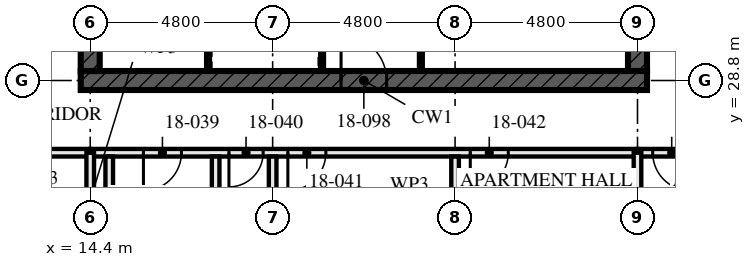
"""IFC4 building model, lengths in metres.
Left out: names, types, materials, properties, quantities, classifications, styles, units other than length and angle.
Written with IfcOpenShell. Run it as: python <this file> out.ifc"""

import sys

from ifc_helpers import new_model, si_unit, direction, frame, frame_2d, origin, place, context, subcontext, project, spatial, rectangle, extrude, element, fill, save


model = new_model("IFC4")
c1 = context("Model", 3, precision=1e-05, world=origin(), true_north=direction((0.0, 1.0)))
c2 = subcontext(c1, "Body", "Model", "MODEL_VIEW")
j1 = project(units=[si_unit("LENGTHUNIT", "METRE"), si_unit("PLANEANGLEUNIT", "RADIAN")], contexts=[c1])
p1 = place(None, origin())
s1 = spatial("IfcSite", under=j1, at=p1, CompositionType="ELEMENT")
p2 = place(p1, origin())
s2 = spatial("IfcBuilding", under=s1, at=p2, CompositionType="ELEMENT")
p3 = place(p2, frame((0.0, 0.0, 69.0)))
s3 = spatial("IfcBuildingStorey", under=s2, at=p3, CompositionType="ELEMENT", Elevation=69.0)
p4 = place(p3, frame((14.15, 28.8, -0.17), z_axis=(0.0, 0.0, 1.0), x_axis=(1.0, 0.0, 0.0)))
e1 = element("IfcWall", 1, at=p4, inside=s3, PredefinedType="SHEAR", context=c2, shape_type="SweptSolid", body=[
    extrude(rectangle(XDim=14.9, YDim=0.5, at=frame_2d((7.45, 0.0))), origin(), (0.0, 0.0, 1.0), 3.5),
])
p5 = place(p4, frame((6.85, 0.0, 0.17)))
e2 = element("IfcOpeningElement", 2, at=p5, cuts=e1, PredefinedType="OPENING", context=c2, shape_type="SweptSolid", body=[
    extrude(rectangle(XDim=1.2, YDim=2.1, at=frame_2d((0.6, 1.05))), frame((0.0, 0.26, 0.0), z_axis=(0.0, -1.0, 0.0), x_axis=(1.0, 0.0, 0.0)), (0.0, 0.0, 1.0), 0.521),
])
p6 = place(p3, frame((14.4, 42.95, -0.17), z_axis=(0.0, 0.0, 1.0), x_axis=(0.0, -1.0, 0.0)))
e3 = element("IfcWall", 3, at=p6, inside=s3, PredefinedType="SHEAR", context=c2, shape_type="SweptSolid", body=[
    extrude(rectangle(XDim=13.9, YDim=0.5, at=frame_2d((6.95, 0.0))), origin(), (0.0, 0.0, 1.0), 3.5),
])
p7 = place(p6, frame((6.35, 0.0, 0.17)))
e4 = element("IfcOpeningElement", 4, at=p7, cuts=e3, PredefinedType="OPENING", context=c2, shape_type="SweptSolid", body=[
    extrude(rectangle(XDim=1.2, YDim=2.1, at=frame_2d((0.6, 1.05))), frame((0.0, 0.26, 0.0), z_axis=(0.0, -1.0, 0.0), x_axis=(1.0, 0.0, 0.0)), (0.0, 0.0, 1.0), 0.521),
])
p8 = place(p3, frame((28.8, 29.05, -0.17), z_axis=(0.0, 0.0, 1.0), x_axis=(0.0, 1.0, 0.0)))
e5 = element("IfcWall", 5, at=p8, inside=s3, PredefinedType="SHEAR", context=c2, shape_type="SweptSolid", body=[
    extrude(rectangle(XDim=13.9, YDim=0.5, at=frame_2d((6.95, 0.0))), origin(), (0.0, 0.0, 1.0), 3.5),
])
p9 = place(p8, frame((6.35, 0.0, 0.17)))
e6 = element("IfcOpeningElement", 6, at=p9, cuts=e5, PredefinedType="OPENING", context=c2, shape_type="SweptSolid", body=[
    extrude(rectangle(XDim=1.2, YDim=2.1, at=frame_2d((0.6, 1.05))), frame((0.0, 0.26, 0.0), z_axis=(0.0, -1.0, 0.0), x_axis=(1.0, 0.0, 0.0)), (0.0, 0.0, 1.0), 0.521),
])
p10 = place(p3, frame((4.8, 26.9, 0.0), z_axis=(0.0, 0.0, 1.0), x_axis=(1.0, 0.0, 0.0)))
e7 = element("IfcWall", 7, at=p10, inside=s3, PredefinedType="PARTITIONING", context=c2, shape_type="SweptSolid", body=[
    extrude(rectangle(XDim=9.6, YDim=0.2, at=frame_2d((4.8, 0.0))), origin(), (0.0, 0.0, 1.0), 3.33),
])
p11 = place(p10, frame((0.4, 0.0, 0.0)))
e8 = element("IfcOpeningElement", 8, at=p11, cuts=e7, PredefinedType="OPENING", context=c2, shape_type="SweptSolid", body=[
    extrude(rectangle(XDim=1.0, YDim=2.1, at=frame_2d((0.5, 1.05))), frame((0.0, 0.111, 0.0), z_axis=(0.0, -1.0, 0.0), x_axis=(1.0, 0.0, 0.0)), (0.0, 0.0, 1.0), 0.221),
])
p12 = place(p10, frame((5.2, 0.0, 0.0)))
e9 = element("IfcOpeningElement", 9, at=p12, cuts=e7, PredefinedType="OPENING", context=c2, shape_type="SweptSolid", body=[
    extrude(rectangle(XDim=1.0, YDim=2.1, at=frame_2d((0.5, 1.05))), frame((0.0, 0.111, 0.0), z_axis=(0.0, -1.0, 0.0), x_axis=(1.0, 0.0, 0.0)), (0.0, 0.0, 1.0), 0.221),
])
for number, where, z_axis, x_axis in (
    (10, (14.9, 22.1, 0.0), (0.0, 0.0, 1.0), (0.0, 1.0, 0.0)),
    (11, (17.7, 22.1, 0.0), (0.0, 0.0, 1.0), (0.0, 1.0, 0.0)),
):
    element("IfcWall", number, at=place(p3, frame(where, z_axis=z_axis, x_axis=x_axis)), inside=s3, PredefinedType="SOLIDWALL", context=c2, shape_type="SweptSolid", body=[
        extrude(rectangle(XDim=4.7, YDim=0.2, at=frame_2d((2.35, 0.0))), origin(), (0.0, 0.0, 1.0), 2.99),
    ])
for number, where, z_axis, x_axis in (
    (12, (19.2, 14.72, 0.0), (0.0, 0.0, 1.0), (0.0, 1.0, 0.0)),
    (13, (24.0, 14.72, 0.0), (0.0, 0.0, 1.0), (0.0, 1.0, 0.0)),
):
    element("IfcWall", number, at=place(p3, frame(where, z_axis=z_axis, x_axis=x_axis)), inside=s3, PredefinedType="PARTITIONING", context=c2, shape_type="SweptSolid", body=[
        extrude(rectangle(XDim=12.08, YDim=0.2, at=frame_2d((6.04, 0.0))), origin(), (0.0, 0.0, 1.0), 2.55),
    ])
p13 = place(p3, frame((14.4, 26.9, 0.0), z_axis=(0.0, 0.0, 1.0), x_axis=(1.0, 0.0, 0.0)))
e14 = element("IfcWall", 14, at=p13, inside=s3, PredefinedType="PARTITIONING", context=c2, shape_type="SweptSolid", body=[
    extrude(rectangle(XDim=14.4, YDim=0.2, at=frame_2d((7.2, 0.0))), origin(), (0.0, 0.0, 1.0), 2.55),
])
p14 = place(p13, frame((1.4, 0.0, 0.0)))
e15 = element("IfcOpeningElement", 15, at=p14, cuts=e14, PredefinedType="OPENING", context=c2, shape_type="SweptSolid", body=[
    extrude(rectangle(XDim=1.0, YDim=2.1, at=frame_2d((0.5, 1.05))), frame((0.0, 0.111, 0.0), z_axis=(0.0, -1.0, 0.0), x_axis=(1.0, 0.0, 0.0)), (0.0, 0.0, 1.0), 0.221),
])
p15 = place(p13, frame((3.65, 0.0, 0.0)))
e16 = element("IfcOpeningElement", 16, at=p15, cuts=e14, PredefinedType="OPENING", context=c2, shape_type="SweptSolid", body=[
    extrude(rectangle(XDim=0.9, YDim=2.1, at=frame_2d((0.45, 1.05))), frame((0.0, 0.111, 0.0), z_axis=(0.0, -1.0, 0.0), x_axis=(1.0, 0.0, 0.0)), (0.0, 0.0, 1.0), 0.221),
])
p16 = place(p13, frame((5.2, 0.0, 0.0)))
e17 = element("IfcOpeningElement", 17, at=p16, cuts=e14, PredefinedType="OPENING", context=c2, shape_type="SweptSolid", body=[
    extrude(rectangle(XDim=1.0, YDim=2.1, at=frame_2d((0.5, 1.05))), frame((0.0, 0.111, 0.0), z_axis=(0.0, -1.0, 0.0), x_axis=(1.0, 0.0, 0.0)), (0.0, 0.0, 1.0), 0.221),
])
p17 = place(p13, frame((10.0, 0.0, 0.0)))
e18 = element("IfcOpeningElement", 18, at=p17, cuts=e14, PredefinedType="OPENING", context=c2, shape_type="SweptSolid", body=[
    extrude(rectangle(XDim=1.0, YDim=2.1, at=frame_2d((0.5, 1.05))), frame((0.0, 0.111, 0.0), z_axis=(0.0, -1.0, 0.0), x_axis=(1.0, 0.0, 0.0)), (0.0, 0.0, 1.0), 0.221),
])
p18 = place(p3, frame((28.8, 26.9, 0.0), z_axis=(0.0, 0.0, 1.0), x_axis=(1.0, 0.0, 0.0)))
e19 = element("IfcWall", 19, at=p18, inside=s3, PredefinedType="PARTITIONING", context=c2, shape_type="SweptSolid", body=[
    extrude(rectangle(XDim=9.6, YDim=0.2, at=frame_2d((4.8, 0.0))), origin(), (0.0, 0.0, 1.0), 3.33),
])
p19 = place(p18, frame((0.4, 0.0, 0.0)))
e20 = element("IfcOpeningElement", 20, at=p19, cuts=e19, PredefinedType="OPENING", context=c2, shape_type="SweptSolid", body=[
    extrude(rectangle(XDim=1.0, YDim=2.1, at=frame_2d((0.5, 1.05))), frame((0.0, 0.111, 0.0), z_axis=(0.0, -1.0, 0.0), x_axis=(1.0, 0.0, 0.0)), (0.0, 0.0, 1.0), 0.221),
])
p20 = place(p18, frame((5.2, 0.0, 0.0)))
e21 = element("IfcOpeningElement", 21, at=p20, cuts=e19, PredefinedType="OPENING", context=c2, shape_type="SweptSolid", body=[
    extrude(rectangle(XDim=1.0, YDim=2.1, at=frame_2d((0.5, 1.05))), frame((0.0, 0.111, 0.0), z_axis=(0.0, -1.0, 0.0), x_axis=(1.0, 0.0, 0.0)), (0.0, 0.0, 1.0), 0.221),
])
p21 = place(p3, frame((20.5, 29.05, 0.0), z_axis=(0.0, 0.0, 1.0), x_axis=(0.0, 1.0, 0.0)))
e22 = element("IfcWall", 22, at=p21, inside=s3, PredefinedType="SOLIDWALL", context=c2, shape_type="SweptSolid", body=[
    extrude(rectangle(XDim=5.8, YDim=0.1, at=frame_2d((2.9, 0.0))), origin(), (0.0, 0.0, 1.0), 3.33),
])
p22 = place(p21, frame((0.8, 0.0, 0.0)))
e23 = element("IfcOpeningElement", 23, at=p22, cuts=e22, PredefinedType="OPENING", context=c2, shape_type="SweptSolid", body=[
    extrude(rectangle(XDim=1.1, YDim=2.3, at=frame_2d((0.55, 1.15))), frame((0.0, 0.061, 0.0), z_axis=(0.0, -1.0, 0.0), x_axis=(1.0, 0.0, 0.0)), (0.0, 0.0, 1.0), 0.121),
])
p23 = place(p21, frame((3.775, 0.0, 0.0)))
e24 = element("IfcOpeningElement", 24, at=p23, cuts=e22, PredefinedType="OPENING", context=c2, shape_type="SweptSolid", body=[
    extrude(rectangle(XDim=1.1, YDim=2.3, at=frame_2d((0.55, 1.15))), frame((0.0, 0.061, 0.0), z_axis=(0.0, -1.0, 0.0), x_axis=(1.0, 0.0, 0.0)), (0.0, 0.0, 1.0), 0.121),
])
p24 = place(p3, frame((23.1, 29.05, 0.0), z_axis=(0.0, 0.0, 1.0), x_axis=(0.0, 1.0, 0.0)))
e25 = element("IfcWall", 25, at=p24, inside=s3, PredefinedType="SOLIDWALL", context=c2, shape_type="SweptSolid", body=[
    extrude(rectangle(XDim=5.8, YDim=0.1, at=frame_2d((2.9, 0.0))), origin(), (0.0, 0.0, 1.0), 3.33),
])
p25 = place(p24, frame((1.0, 0.0, 0.0)))
e26 = element("IfcOpeningElement", 26, at=p25, cuts=e25, PredefinedType="OPENING", context=c2, shape_type="SweptSolid", body=[
    extrude(rectangle(XDim=0.7, YDim=2.1, at=frame_2d((0.35, 1.05))), frame((0.0, 0.061, 0.0), z_axis=(0.0, -1.0, 0.0), x_axis=(1.0, 0.0, 0.0)), (0.0, 0.0, 1.0), 0.121),
])
p26 = place(p3, frame((17.5, 29.05, 0.0), z_axis=(0.0, 0.0, 1.0), x_axis=(0.0, 1.0, 0.0)))
e27 = element("IfcWall", 27, at=p26, inside=s3, PredefinedType="SOLIDWALL", context=c2, shape_type="SweptSolid", body=[
    extrude(rectangle(XDim=5.8, YDim=0.1, at=frame_2d((2.9, 0.0))), origin(), (0.0, 0.0, 1.0), 3.33),
])
for number, where, z_axis, x_axis in (
    (28, (14.4, 24.395, 0.0), (0.0, 0.0, 1.0), (0.0, 1.0, 0.0)),
    (29, (28.8, 24.395, 0.0), (0.0, 0.0, 1.0), (0.0, 1.0, 0.0)),
):
    element("IfcWall", number, at=place(p3, frame(where, z_axis=z_axis, x_axis=x_axis)), inside=s3, PredefinedType="PARTITIONING", context=c2, shape_type="SweptSolid", body=[
        extrude(rectangle(XDim=2.505, YDim=0.2, at=frame_2d((1.252, 0.0))), origin(), (0.0, 0.0, 1.0), 2.32),
    ])
p27 = place(p14, frame((1.0, 0.0, 0.0), z_axis=(0.0, 0.0, 1.0), x_axis=(-1.0, 0.0, 0.0)))
e30 = element("IfcDoor", 30, at=p27, inside=s3, OperationType="SINGLE_SWING_LEFT", PredefinedType="DOOR", context=c2, shape_type="SweptSolid", body=[
    extrude(rectangle(XDim=1.0, YDim=2.1, at=frame_2d((0.5, 1.05))), frame((0.0, 0.032, 0.0), z_axis=(0.0, -1.0, 0.0), x_axis=(1.0, 0.0, 0.0)), (0.0, 0.0, 1.0), 0.064),
])
fill(e15, e30)
p28 = place(p15, frame((0.9, 0.0, 0.0), z_axis=(0.0, 0.0, 1.0), x_axis=(-1.0, 0.0, 0.0)))
e31 = element("IfcDoor", 31, at=p28, inside=s3, OperationType="SINGLE_SWING_LEFT", PredefinedType="DOOR", context=c2, shape_type="SweptSolid", body=[
    extrude(rectangle(XDim=0.9, YDim=2.1, at=frame_2d((0.45, 1.05))), frame((0.0, 0.027, 0.0), z_axis=(0.0, -1.0, 0.0), x_axis=(1.0, 0.0, 0.0)), (0.0, 0.0, 1.0), 0.054),
])
fill(e16, e31)
p29 = place(p16, frame((1.0, 0.0, 0.0), z_axis=(0.0, 0.0, 1.0), x_axis=(-1.0, 0.0, 0.0)))
e32 = element("IfcDoor", 32, at=p29, inside=s3, OperationType="SINGLE_SWING_LEFT", PredefinedType="DOOR", context=c2, shape_type="SweptSolid", body=[
    extrude(rectangle(XDim=1.0, YDim=2.1, at=frame_2d((0.5, 1.05))), frame((0.0, 0.027, 0.0), z_axis=(0.0, -1.0, 0.0), x_axis=(1.0, 0.0, 0.0)), (0.0, 0.0, 1.0), 0.054),
])
fill(e17, e32)
p30 = place(p17, frame((1.0, 0.0, 0.0), z_axis=(0.0, 0.0, 1.0), x_axis=(-1.0, 0.0, 0.0)))
e33 = element("IfcDoor", 33, at=p30, inside=s3, OperationType="SINGLE_SWING_LEFT", PredefinedType="DOOR", context=c2, shape_type="SweptSolid", body=[
    extrude(rectangle(XDim=1.0, YDim=2.1, at=frame_2d((0.5, 1.05))), frame((0.0, 0.027, 0.0), z_axis=(0.0, -1.0, 0.0), x_axis=(1.0, 0.0, 0.0)), (0.0, 0.0, 1.0), 0.054),
])
fill(e18, e33)
p31 = place(p19, frame((1.0, 0.0, 0.0), z_axis=(0.0, 0.0, 1.0), x_axis=(-1.0, 0.0, 0.0)))
e34 = element("IfcDoor", 34, at=p31, inside=s3, OperationType="SINGLE_SWING_RIGHT", PredefinedType="DOOR", context=c2, shape_type="SweptSolid", body=[
    extrude(rectangle(XDim=1.0, YDim=2.1, at=frame_2d((0.5, 1.05))), frame((0.0, 0.027, 0.0), z_axis=(0.0, -1.0, 0.0), x_axis=(1.0, 0.0, 0.0)), (0.0, 0.0, 1.0), 0.054),
])
fill(e20, e34)
p32 = place(p5, origin())
e35 = element("IfcDoor", 35, at=p32, inside=s3, OperationType="SINGLE_SWING_LEFT", PredefinedType="DOOR", context=c2, shape_type="SweptSolid", body=[
    extrude(rectangle(XDim=1.2, YDim=2.1, at=frame_2d((0.6, 1.05))), frame((0.0, 0.027, 0.0), z_axis=(0.0, -1.0, 0.0), x_axis=(1.0, 0.0, 0.0)), (0.0, 0.0, 1.0), 0.054),
])
fill(e2, e35)
save(model, sys.argv[1])
